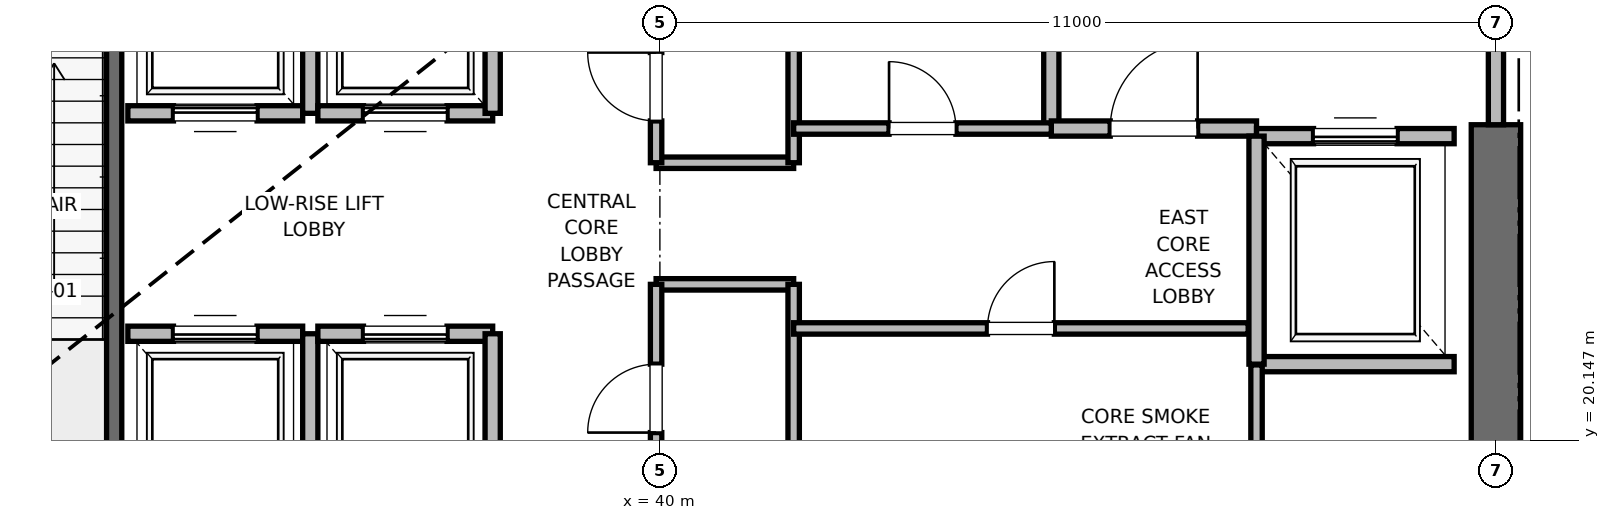
"""IFC4 building model, lengths in metres.
Left out: names, types, materials, properties, quantities, classifications, styles, units other than length and angle.
Written with IfcOpenShell. Run it as: python <this file> out.ifc"""

import sys

from ifc_helpers import new_model, si_unit, direction, frame, frame_2d, origin, place, context, subcontext, project, spatial, rectangle, extrude, element, fill, save


model = new_model("IFC4")
c1 = context("Model", 3, precision=1e-05, world=origin(), true_north=direction((0.0, 1.0)))
c2 = subcontext(c1, "Body", "Model", "MODEL_VIEW")
j1 = project(units=[si_unit("LENGTHUNIT", "METRE"), si_unit("PLANEANGLEUNIT", "RADIAN")], contexts=[c1])
p1 = place(None, origin())
s1 = spatial("IfcSite", under=j1, at=p1, CompositionType="ELEMENT")
p2 = place(p1, origin())
s2 = spatial("IfcBuilding", under=s1, at=p2, CompositionType="ELEMENT")
p3 = place(p2, frame((0.0, 0.0, 107.6)))
s3 = spatial("IfcBuildingStorey", under=s2, at=p3, CompositionType="ELEMENT", Elevation=107.6)
p4 = place(p3, frame((51.0, 18.5, 0.0), z_axis=(0.0, 0.0, 1.0), x_axis=(0.0, 1.0, 0.0)))
e1 = element("IfcWall", 1, at=p4, inside=s3, PredefinedType="SHEAR", context=c2, shape_type="SweptSolid", body=[
    extrude(rectangle(XDim=5.8, YDim=0.65, at=frame_2d((2.9, 0.0))), origin(), (0.0, 0.0, 1.0), 5.1),
])
p5 = place(p3, frame((32.82, 18.6, 0.0), z_axis=(0.0, 0.0, 1.0), x_axis=(0.0, 1.0, 0.0)))
e2 = element("IfcWall", 2, at=p5, inside=s3, PredefinedType="SOLIDWALL", context=c2, shape_type="SweptSolid", body=[
    extrude(rectangle(XDim=8.78, YDim=0.2, at=frame_2d((4.39, 0.0))), origin(), (0.0, 0.0, 1.0), 5.1),
])
p6 = place(p3, frame((45.15, 24.25, 0.0), z_axis=(0.0, 0.0, 1.0), x_axis=(0.0, 1.0, 0.0)))
e3 = element("IfcWall", 3, at=p6, inside=s3, PredefinedType="PARTITIONING", context=c2, shape_type="SweptSolid", body=[
    extrude(rectangle(XDim=3.37, YDim=0.2, at=frame_2d((1.685, 0.0))), origin(), (0.0, 0.0, 1.0), 5.1),
])
p7 = place(p3, frame((45.15, 24.25, 0.0), z_axis=(0.0, 0.0, 1.0), x_axis=(1.0, 0.0, 0.0)))
e4 = element("IfcWall", 4, at=p7, inside=s3, PredefinedType="PARTITIONING", context=c2, shape_type="SweptSolid", body=[
    extrude(rectangle(XDim=2.7, YDim=0.2, at=frame_2d((1.35, 0.0))), origin(), (0.0, 0.0, 1.0), 5.1),
])
p8 = place(p7, frame((0.775, 0.0, 0.0)))
e5 = element("IfcOpeningElement", 5, at=p8, cuts=e4, PredefinedType="OPENING", context=c2, shape_type="SweptSolid", body=[
    extrude(rectangle(XDim=1.15, YDim=2.2, at=frame_2d((0.575, 1.1))), frame((0.0, 0.1, 0.0), z_axis=(0.0, -1.0, 0.0), x_axis=(1.0, 0.0, 0.0)), (0.0, 0.0, 1.0), 0.2),
])
p9 = place(p3, frame((51.0, 24.3, 0.0), z_axis=(0.0, 0.0, 1.0), x_axis=(0.0, 1.0, 0.0)))
e6 = element("IfcWall", 6, at=p9, inside=s3, PredefinedType="PARTITIONING", context=c2, shape_type="SweptSolid", body=[
    extrude(rectangle(XDim=3.4, YDim=0.2, at=frame_2d((1.7, 0.0))), origin(), (0.0, 0.0, 1.0), 3.88),
])
p10 = place(p9, frame((1.125, 0.0, 0.0)))
e7 = element("IfcOpeningElement", 7, at=p10, cuts=e6, PredefinedType="OPENING", context=c2, shape_type="SweptSolid", body=[
    extrude(rectangle(XDim=1.15, YDim=2.2, at=frame_2d((0.575, 1.1))), frame((0.0, 0.1, 0.0), z_axis=(0.0, -1.0, 0.0), x_axis=(1.0, 0.0, 0.0)), (0.0, 0.0, 1.0), 0.2),
])
p11 = place(p3, frame((47.85, 21.15, 0.0), z_axis=(0.0, 0.0, 1.0), x_axis=(1.0, 0.0, 0.0)))
e8 = element("IfcWall", 8, at=p11, inside=s3, PredefinedType="SOLIDWALL", context=c2, shape_type="SweptSolid", body=[
    extrude(rectangle(XDim=2.6, YDim=0.2, at=frame_2d((1.3, 0.0))), origin(), (0.0, 0.0, 1.0), 5.1),
])
p12 = place(p3, frame((50.45, 24.15, 0.0), z_axis=(0.0, 0.0, 1.0), x_axis=(-1.0, 0.0, 0.0)))
e9 = element("IfcWall", 9, at=p12, inside=s3, PredefinedType="SOLIDWALL", context=c2, shape_type="SweptSolid", body=[
    extrude(rectangle(XDim=2.6, YDim=0.2, at=frame_2d((1.3, 0.0))), origin(), (0.0, 0.0, 1.0), 3.88),
])
p13 = place(p12, frame((0.75, 0.0, 0.0)))
e10 = element("IfcOpeningElement", 10, at=p13, cuts=e9, PredefinedType="OPENING", context=c2, shape_type="SweptSolid", body=[
    extrude(rectangle(XDim=1.1, YDim=2.2, at=frame_2d((0.55, 1.1))), frame((0.0, 0.1, 0.0), z_axis=(0.0, -1.0, 0.0), x_axis=(1.0, 0.0, 0.0)), (0.0, 0.0, 1.0), 0.2),
])
p14 = place(p3, frame((47.85, 24.15, 0.0), z_axis=(0.0, 0.0, 1.0), x_axis=(0.0, -1.0, 0.0)))
e11 = element("IfcWall", 11, at=p14, inside=s3, PredefinedType="SOLIDWALL", context=c2, shape_type="SweptSolid", body=[
    extrude(rectangle(XDim=3.0, YDim=0.2, at=frame_2d((1.5, 0.0))), origin(), (0.0, 0.0, 1.0), 5.1),
])
p15 = place(p3, frame((35.3, 21.55, 0.0), z_axis=(0.0, 0.0, 1.0), x_axis=(-1.0, 0.0, 0.0)))
e12 = element("IfcWall", 12, at=p15, inside=s3, PredefinedType="SOLIDWALL", context=c2, shape_type="SweptSolid", body=[
    extrude(rectangle(XDim=2.3, YDim=0.2, at=frame_2d((1.15, 0.0))), origin(), (0.0, 0.0, 1.0), 5.1),
])
p16 = place(p15, frame((0.6, 0.0, 0.0)))
e13 = element("IfcOpeningElement", 13, at=p16, cuts=e12, PredefinedType="OPENING", context=c2, shape_type="SweptSolid", body=[
    extrude(rectangle(XDim=1.1, YDim=2.2, at=frame_2d((0.55, 1.1))), frame((0.0, 0.1, 0.0), z_axis=(0.0, -1.0, 0.0), x_axis=(1.0, 0.0, 0.0)), (0.0, 0.0, 1.0), 0.2),
])
p17 = place(p3, frame((35.4, 18.95, 0.0), z_axis=(0.0, 0.0, 1.0), x_axis=(0.0, 1.0, 0.0)))
e14 = element("IfcWall", 14, at=p17, inside=s3, PredefinedType="SOLIDWALL", context=c2, shape_type="SweptSolid", body=[
    extrude(rectangle(XDim=2.6, YDim=0.2, at=frame_2d((1.3, 0.0))), origin(), (0.0, 0.0, 1.0), 5.1),
])
p18 = place(p3, frame((37.8, 21.55, 0.0), z_axis=(0.0, 0.0, 1.0), x_axis=(-1.0, 0.0, 0.0)))
e15 = element("IfcWall", 15, at=p18, inside=s3, PredefinedType="SOLIDWALL", context=c2, shape_type="SweptSolid", body=[
    extrude(rectangle(XDim=2.3, YDim=0.2, at=frame_2d((1.15, 0.0))), origin(), (0.0, 0.0, 1.0), 5.1),
])
p19 = place(p18, frame((0.6, 0.0, 0.0)))
e16 = element("IfcOpeningElement", 16, at=p19, cuts=e15, PredefinedType="OPENING", context=c2, shape_type="SweptSolid", body=[
    extrude(rectangle(XDim=1.1, YDim=2.2, at=frame_2d((0.55, 1.1))), frame((0.0, 0.1, 0.0), z_axis=(0.0, -1.0, 0.0), x_axis=(1.0, 0.0, 0.0)), (0.0, 0.0, 1.0), 0.2),
])
p20 = place(p3, frame((37.8, 18.95, 0.0), z_axis=(0.0, 0.0, 1.0), x_axis=(0.0, 1.0, 0.0)))
e17 = element("IfcWall", 17, at=p20, inside=s3, PredefinedType="SOLIDWALL", context=c2, shape_type="SweptSolid", body=[
    extrude(rectangle(XDim=2.6, YDim=0.2, at=frame_2d((1.3, 0.0))), origin(), (0.0, 0.0, 1.0), 3.88),
])
p21 = place(p3, frame((33.0, 24.45, 0.0), z_axis=(0.0, 0.0, 1.0), x_axis=(1.0, 0.0, 0.0)))
e18 = element("IfcWall", 18, at=p21, inside=s3, PredefinedType="SOLIDWALL", context=c2, shape_type="SweptSolid", body=[
    extrude(rectangle(XDim=2.3, YDim=0.2, at=frame_2d((1.15, 0.0))), origin(), (0.0, 0.0, 1.0), 5.1),
])
p22 = place(p21, frame((0.6, 0.0, 0.0)))
e19 = element("IfcOpeningElement", 19, at=p22, cuts=e18, PredefinedType="OPENING", context=c2, shape_type="SweptSolid", body=[
    extrude(rectangle(XDim=1.1, YDim=2.2, at=frame_2d((0.55, 1.1))), frame((0.0, 0.1, 0.0), z_axis=(0.0, -1.0, 0.0), x_axis=(1.0, 0.0, 0.0)), (0.0, 0.0, 1.0), 0.2),
])
p23 = place(p3, frame((35.4, 24.45, 0.0), z_axis=(0.0, 0.0, 1.0), x_axis=(0.0, 1.0, 0.0)))
e20 = element("IfcWall", 20, at=p23, inside=s3, PredefinedType="SOLIDWALL", context=c2, shape_type="SweptSolid", body=[
    extrude(rectangle(XDim=2.6, YDim=0.2, at=frame_2d((1.3, 0.0))), origin(), (0.0, 0.0, 1.0), 5.1),
])
p24 = place(p3, frame((35.5, 24.45, 0.0), z_axis=(0.0, 0.0, 1.0), x_axis=(1.0, 0.0, 0.0)))
e21 = element("IfcWall", 21, at=p24, inside=s3, PredefinedType="SOLIDWALL", context=c2, shape_type="SweptSolid", body=[
    extrude(rectangle(XDim=2.3, YDim=0.2, at=frame_2d((1.15, 0.0))), origin(), (0.0, 0.0, 1.0), 5.1),
])
p25 = place(p24, frame((0.6, 0.0, 0.0)))
e22 = element("IfcOpeningElement", 22, at=p25, cuts=e21, PredefinedType="OPENING", context=c2, shape_type="SweptSolid", body=[
    extrude(rectangle(XDim=1.1, YDim=2.2, at=frame_2d((0.55, 1.1))), frame((0.0, 0.1, 0.0), z_axis=(0.0, -1.0, 0.0), x_axis=(1.0, 0.0, 0.0)), (0.0, 0.0, 1.0), 0.2),
])
p26 = place(p3, frame((37.8, 24.45, 0.0), z_axis=(0.0, 0.0, 1.0), x_axis=(0.0, 1.0, 0.0)))
e23 = element("IfcWall", 23, at=p26, inside=s3, PredefinedType="SOLIDWALL", context=c2, shape_type="SweptSolid", body=[
    extrude(rectangle(XDim=2.6, YDim=0.2, at=frame_2d((1.3, 0.0))), origin(), (0.0, 0.0, 1.0), 5.1),
])
for number, where, z_axis, x_axis in (
    (24, (39.95, 22.2, 0.0), (0.0, 0.0, 1.0), (1.0, 0.0, 0.0)),
    (25, (39.95, 23.8, 0.0), (0.0, 0.0, 1.0), (1.0, 0.0, 0.0)),
):
    element("IfcWall", number, at=place(p3, frame(where, z_axis=z_axis, x_axis=x_axis)), inside=s3, PredefinedType="PARTITIONING", context=c2, shape_type="SweptSolid", body=[
        extrude(rectangle(XDim=1.81, YDim=0.15, at=frame_2d((0.905, 0.0))), origin(), (0.0, 0.0, 1.0), 2.85),
    ])
p27 = place(p3, frame((41.76, 18.6, 0.0), z_axis=(0.0, 0.0, 1.0), x_axis=(0.0, 1.0, 0.0)))
e26 = element("IfcWall", 26, at=p27, inside=s3, PredefinedType="PARTITIONING", context=c2, shape_type="SweptSolid", body=[
    extrude(rectangle(XDim=3.6, YDim=0.15, at=frame_2d((1.8, 0.0))), origin(), (0.0, 0.0, 1.0), 2.85),
])
p28 = place(p3, frame((41.76, 23.8, 0.0), z_axis=(0.0, 0.0, 1.0), x_axis=(0.0, 1.0, 0.0)))
e27 = element("IfcWall", 27, at=p28, inside=s3, PredefinedType="PARTITIONING", context=c2, shape_type="SweptSolid", body=[
    extrude(rectangle(XDim=4.0, YDim=0.15, at=frame_2d((2.0, 0.0))), origin(), (0.0, 0.0, 1.0), 2.85),
])
p29 = place(p3, frame((39.95, 19.2, 0.0), z_axis=(0.0, 0.0, 1.0), x_axis=(0.0, 1.0, 0.0)))
e28 = element("IfcWall", 28, at=p29, inside=s3, PredefinedType="PARTITIONING", context=c2, shape_type="SweptSolid", body=[
    extrude(rectangle(XDim=3.0, YDim=0.15, at=frame_2d((1.5, 0.0))), origin(), (0.0, 0.0, 1.0), 2.85),
])
p30 = place(p29, frame((1.05, 0.0, 0.0)))
e29 = element("IfcOpeningElement", 29, at=p30, cuts=e28, PredefinedType="OPENING", context=c2, shape_type="SweptSolid", body=[
    extrude(rectangle(XDim=0.9, YDim=2.1, at=frame_2d((0.45, 1.05))), frame((0.0, 0.075, 0.0), z_axis=(0.0, -1.0, 0.0), x_axis=(1.0, 0.0, 0.0)), (0.0, 0.0, 1.0), 0.15),
])
p31 = place(p3, frame((39.95, 23.8, 0.0), z_axis=(0.0, 0.0, 1.0), x_axis=(0.0, 1.0, 0.0)))
e30 = element("IfcWall", 30, at=p31, inside=s3, PredefinedType="PARTITIONING", context=c2, shape_type="SweptSolid", body=[
    extrude(rectangle(XDim=2.0, YDim=0.15, at=frame_2d((1.0, 0.0))), origin(), (0.0, 0.0, 1.0), 2.85),
])
p32 = place(p31, frame((0.55, 0.0, 0.0)))
e31 = element("IfcOpeningElement", 31, at=p32, cuts=e30, PredefinedType="OPENING", context=c2, shape_type="SweptSolid", body=[
    extrude(rectangle(XDim=0.9, YDim=2.1, at=frame_2d((0.45, 1.05))), frame((0.0, 0.075, 0.0), z_axis=(0.0, -1.0, 0.0), x_axis=(1.0, 0.0, 0.0)), (0.0, 0.0, 1.0), 0.15),
])
p33 = place(p3, frame((47.85, 18.6, 0.0), z_axis=(0.0, 0.0, 1.0), x_axis=(0.0, 1.0, 0.0)))
e32 = element("IfcWall", 32, at=p33, inside=s3, PredefinedType="PARTITIONING", context=c2, shape_type="SweptSolid", body=[
    extrude(rectangle(XDim=2.54, YDim=0.15, at=frame_2d((1.27, 0.0))), origin(), (0.0, 0.0, 1.0), 2.85),
])
p34 = place(p3, frame((41.76, 21.62, 0.0), z_axis=(0.0, 0.0, 1.0), x_axis=(1.0, 0.0, 0.0)))
e33 = element("IfcWall", 33, at=p34, inside=s3, PredefinedType="PARTITIONING", context=c2, shape_type="SweptSolid", body=[
    extrude(rectangle(XDim=5.98, YDim=0.15, at=frame_2d((2.99, 0.0))), origin(), (0.0, 0.0, 1.0), 2.85),
])
p35 = place(p34, frame((2.55, 0.0, 0.0)))
e34 = element("IfcOpeningElement", 34, at=p35, cuts=e33, PredefinedType="OPENING", context=c2, shape_type="SweptSolid", body=[
    extrude(rectangle(XDim=0.88, YDim=2.1, at=frame_2d((0.44, 1.05))), frame((0.0, 0.075, 0.0), z_axis=(0.0, -1.0, 0.0), x_axis=(1.0, 0.0, 0.0)), (0.0, 0.0, 1.0), 0.15),
])
p36 = place(p3, frame((41.76, 24.25, 0.0), z_axis=(0.0, 0.0, 1.0), x_axis=(1.0, 0.0, 0.0)))
e35 = element("IfcWall", 35, at=p36, inside=s3, PredefinedType="PARTITIONING", context=c2, shape_type="SweptSolid", body=[
    extrude(rectangle(XDim=3.39, YDim=0.15, at=frame_2d((1.695, 0.0))), origin(), (0.0, 0.0, 1.0), 2.85),
])
p37 = place(p36, frame((1.255, 0.0, 0.0)))
e36 = element("IfcOpeningElement", 36, at=p37, cuts=e35, PredefinedType="OPENING", context=c2, shape_type="SweptSolid", body=[
    extrude(rectangle(XDim=0.88, YDim=2.1, at=frame_2d((0.44, 1.05))), frame((0.0, 0.075, 0.0), z_axis=(0.0, -1.0, 0.0), x_axis=(1.0, 0.0, 0.0)), (0.0, 0.0, 1.0), 0.15),
])
p38 = place(p8, origin())
e37 = element("IfcDoor", 37, at=p38, inside=s3, OperationType="SINGLE_SWING_RIGHT", PredefinedType="DOOR", context=c2, shape_type="SweptSolid", body=[
    extrude(rectangle(XDim=1.15, YDim=2.2, at=frame_2d((0.575, 1.1))), frame((0.0, 0.025, 0.0), z_axis=(0.0, -1.0, 0.0), x_axis=(1.0, 0.0, 0.0)), (0.0, 0.0, 1.0), 0.05),
])
fill(e5, e37)
p39 = place(p13, origin())
e38 = element("IfcDoor", 38, at=p39, inside=s3, OperationType="SLIDING_TO_RIGHT", PredefinedType="DOOR", context=c2, shape_type="SweptSolid", body=[
    extrude(rectangle(XDim=1.1, YDim=2.2, at=frame_2d((0.55, 1.1))), frame((0.0, 0.025, 0.0), z_axis=(0.0, -1.0, 0.0), x_axis=(1.0, 0.0, 0.0)), (0.0, 0.0, 1.0), 0.05),
])
fill(e10, e38)
p40 = place(p16, origin())
e39 = element("IfcDoor", 39, at=p40, inside=s3, OperationType="SLIDING_TO_RIGHT", PredefinedType="DOOR", context=c2, shape_type="SweptSolid", body=[
    extrude(rectangle(XDim=1.1, YDim=2.2, at=frame_2d((0.55, 1.1))), frame((0.0, 0.025, 0.0), z_axis=(0.0, -1.0, 0.0), x_axis=(1.0, 0.0, 0.0)), (0.0, 0.0, 1.0), 0.05),
])
fill(e13, e39)
p41 = place(p19, origin())
e40 = element("IfcDoor", 40, at=p41, inside=s3, OperationType="SLIDING_TO_RIGHT", PredefinedType="DOOR", context=c2, shape_type="SweptSolid", body=[
    extrude(rectangle(XDim=1.1, YDim=2.2, at=frame_2d((0.55, 1.1))), frame((0.0, 0.025, 0.0), z_axis=(0.0, -1.0, 0.0), x_axis=(1.0, 0.0, 0.0)), (0.0, 0.0, 1.0), 0.05),
])
fill(e16, e40)
p42 = place(p22, origin())
e41 = element("IfcDoor", 41, at=p42, inside=s3, OperationType="SLIDING_TO_RIGHT", PredefinedType="DOOR", context=c2, shape_type="SweptSolid", body=[
    extrude(rectangle(XDim=1.1, YDim=2.2, at=frame_2d((0.55, 1.1))), frame((0.0, 0.025, 0.0), z_axis=(0.0, -1.0, 0.0), x_axis=(1.0, 0.0, 0.0)), (0.0, 0.0, 1.0), 0.05),
])
fill(e19, e41)
p43 = place(p25, origin())
e42 = element("IfcDoor", 42, at=p43, inside=s3, OperationType="SLIDING_TO_RIGHT", PredefinedType="DOOR", context=c2, shape_type="SweptSolid", body=[
    extrude(rectangle(XDim=1.1, YDim=2.2, at=frame_2d((0.55, 1.1))), frame((0.0, 0.025, 0.0), z_axis=(0.0, -1.0, 0.0), x_axis=(1.0, 0.0, 0.0)), (0.0, 0.0, 1.0), 0.05),
])
fill(e22, e42)
p44 = place(p30, origin())
e43 = element("IfcDoor", 43, at=p44, inside=s3, OperationType="SINGLE_SWING_LEFT", PredefinedType="DOOR", context=c2, shape_type="SweptSolid", body=[
    extrude(rectangle(XDim=0.9, YDim=2.1, at=frame_2d((0.45, 1.05))), frame((0.0, 0.025, 0.0), z_axis=(0.0, -1.0, 0.0), x_axis=(1.0, 0.0, 0.0)), (0.0, 0.0, 1.0), 0.05),
])
fill(e29, e43)
p45 = place(p32, origin())
e44 = element("IfcDoor", 44, at=p45, inside=s3, OperationType="SINGLE_SWING_RIGHT", PredefinedType="DOOR", context=c2, shape_type="SweptSolid", body=[
    extrude(rectangle(XDim=0.9, YDim=2.1, at=frame_2d((0.45, 1.05))), frame((0.0, 0.025, 0.0), z_axis=(0.0, -1.0, 0.0), x_axis=(1.0, 0.0, 0.0)), (0.0, 0.0, 1.0), 0.05),
])
fill(e31, e44)
p46 = place(p35, origin())
e45 = element("IfcDoor", 45, at=p46, inside=s3, OperationType="SINGLE_SWING_RIGHT", PredefinedType="DOOR", context=c2, shape_type="SweptSolid", body=[
    extrude(rectangle(XDim=0.88, YDim=2.1, at=frame_2d((0.44, 1.05))), frame((0.0, 0.025, 0.0), z_axis=(0.0, -1.0, 0.0), x_axis=(1.0, 0.0, 0.0)), (0.0, 0.0, 1.0), 0.05),
])
fill(e34, e45)
p47 = place(p37, origin())
e46 = element("IfcDoor", 46, at=p47, inside=s3, OperationType="SINGLE_SWING_LEFT", PredefinedType="DOOR", context=c2, shape_type="SweptSolid", body=[
    extrude(rectangle(XDim=0.88, YDim=2.1, at=frame_2d((0.44, 1.05))), frame((0.0, 0.025, 0.0), z_axis=(0.0, -1.0, 0.0), x_axis=(1.0, 0.0, 0.0)), (0.0, 0.0, 1.0), 0.05),
])
fill(e36, e46)
save(model, sys.argv[1])
